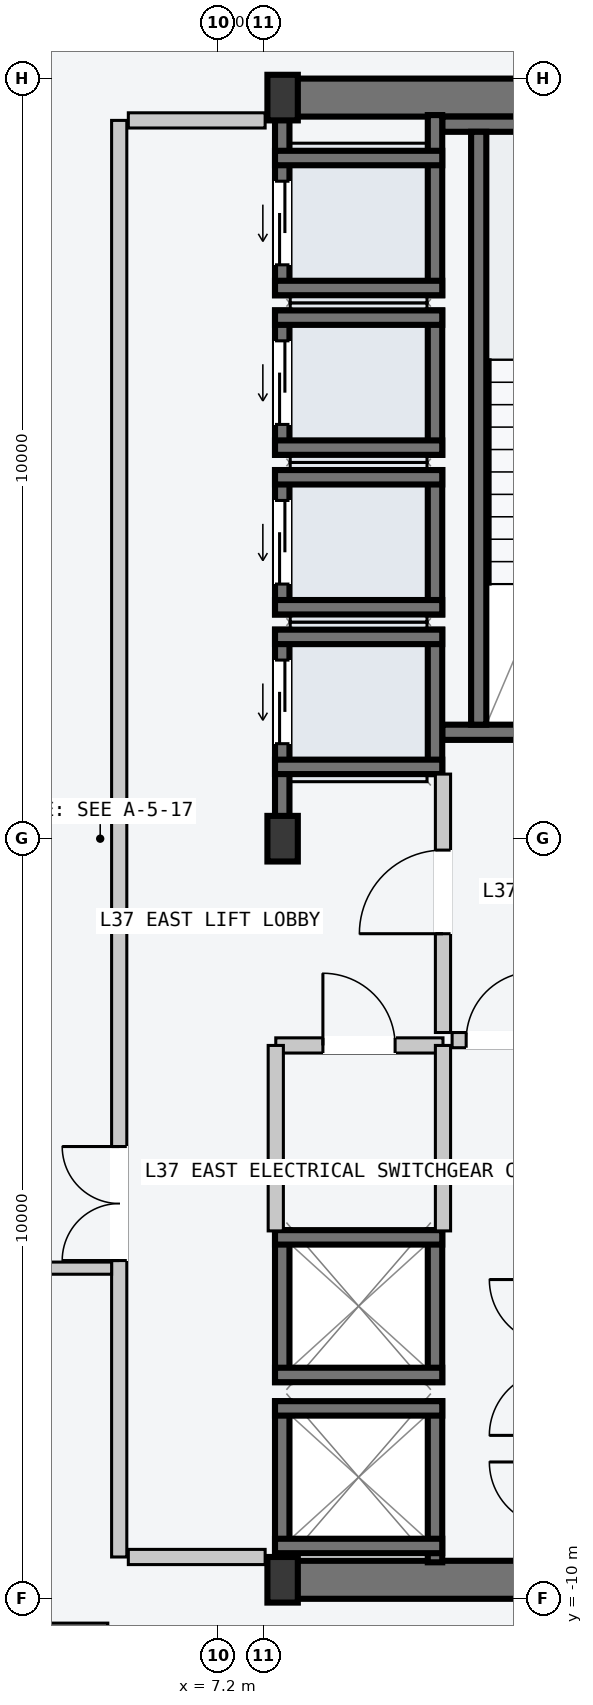
"""IFC4 building model, lengths in metres.
Left out: names, types, materials, properties, quantities, classifications, styles, units other than length and angle.
Written with IfcOpenShell. Run it as: python <this file> out.ifc"""

import sys

from ifc_helpers import new_model, si_unit, direction, frame, frame_2d, origin, origin_2d, place, context, subcontext, project, spatial, rectangle, i_section, extrude, element, fill, save


model = new_model("IFC4")
c1 = context("Model", 3, precision=1e-05, world=origin(), true_north=direction((0.0, 1.0)))
c2 = subcontext(c1, "Body", "Model", "MODEL_VIEW")
j1 = project(units=[si_unit("LENGTHUNIT", "METRE"), si_unit("PLANEANGLEUNIT", "RADIAN")], contexts=[c1])
p1 = place(None, origin())
s1 = spatial("IfcSite", under=j1, at=p1, CompositionType="ELEMENT")
p2 = place(p1, origin())
s2 = spatial("IfcBuilding", under=s1, at=p2, CompositionType="ELEMENT")
p3 = place(p2, frame((0.0, 0.0, 142.2)))
s3 = spatial("IfcBuildingStorey", under=s2, at=p3, CompositionType="ELEMENT", Elevation=142.2)
for number, where, z_axis, x_axis in (
    (1, (8.07, -9.75, -0.2), (0.0, 0.0, 1.0), (1.0, 0.0, 0.0)),
    (2, (8.07, 9.75, -0.2), (0.0, 0.0, 1.0), (1.0, 0.0, 0.0)),
):
    element("IfcWall", number, at=place(p3, frame(where, z_axis=z_axis, x_axis=x_axis)), inside=s3, PredefinedType="SHEAR", context=c2, shape_type="SweptSolid", body=[
        extrude(rectangle(XDim=6.46, YDim=0.5, at=frame_2d((3.23, 0.0))), origin(), (0.0, 0.0, 1.0), 3.6),
    ])
p4 = place(p3, frame((10.15, 1.4, -0.2), z_axis=(0.0, 0.0, 1.0), x_axis=(1.0, 0.0, 0.0)))
e3 = element("IfcWall", 3, at=p4, inside=s3, PredefinedType="SOLIDWALL", context=c2, shape_type="SweptSolid", body=[
    extrude(rectangle(XDim=4.1, YDim=0.2, at=frame_2d((2.05, 0.0))), origin(), (0.0, 0.0, 1.0), 3.6),
])
p5 = place(p4, frame((1.5, 0.0, 0.2)))
e4 = element("IfcOpeningElement", 4, at=p5, cuts=e3, PredefinedType="OPENING", context=c2, shape_type="SweptSolid", body=[
    extrude(rectangle(XDim=1.12, YDim=2.18, at=frame_2d((0.56, 1.09))), frame((0.0, 0.11, 0.0), z_axis=(0.0, -1.0, 0.0), x_axis=(1.0, 0.0, 0.0)), (0.0, 0.0, 1.0), 0.22),
])
p6 = place(p3, frame((10.15, 9.4, -0.2), z_axis=(0.0, 0.0, 1.0), x_axis=(1.0, 0.0, 0.0)))
e5 = element("IfcWall", 5, at=p6, inside=s3, PredefinedType="SOLIDWALL", context=c2, shape_type="SweptSolid", body=[
    extrude(rectangle(XDim=4.1, YDim=0.2, at=frame_2d((2.05, 0.0))), origin(), (0.0, 0.0, 1.0), 3.6),
])
p7 = place(p3, frame((10.63, 1.5, -0.2), z_axis=(0.0, 0.0, 1.0), x_axis=(0.0, 1.0, 0.0)))
e6 = element("IfcWall", 6, at=p7, inside=s3, PredefinedType="SOLIDWALL", context=c2, shape_type="SweptSolid", body=[
    extrude(rectangle(XDim=7.8, YDim=0.2, at=frame_2d((3.9, 0.0))), origin(), (0.0, 0.0, 1.0), 3.6),
])
for number, where, z_axis, x_axis in (
    (7, (8.05, -9.75, 0.0), (0.0, 0.0, 1.0), (1.0, 0.0, 0.0)),
    (8, (8.05, 0.0, 0.0), (0.0, 0.0, 1.0), (1.0, 0.0, 0.0)),
    (9, (8.05, 9.75, 0.0), (0.0, 0.0, 1.0), (1.0, 0.0, 0.0)),
):
    element("IfcColumn", number, at=place(p3, frame(where, z_axis=z_axis, x_axis=x_axis)), inside=s3, PredefinedType="COLUMN", context=c2, shape_type="SweptSolid", body=[
        extrude(i_section(OverallWidth=0.4, OverallDepth=0.6, WebThickness=0.022, FlangeThickness=0.036, at=origin_2d()), origin(), (0.0, 0.0, 1.0), 3.6),
    ])
p8 = place(p3, frame((8.045, 0.21, -0.2), z_axis=(0.0, 0.0, 1.0), x_axis=(0.0, 1.0, 0.0)))
e10 = element("IfcWall", 10, at=p8, inside=s3, PredefinedType="SOLIDWALL", context=c2, shape_type="SweptSolid", body=[
    extrude(rectangle(XDim=2.54, YDim=0.19, at=frame_2d((1.27, 0.0))), origin(), (0.0, 0.0, 1.0), 3.6),
])
p9 = place(p8, frame((1.04, 0.0, 0.2)))
e11 = element("IfcOpeningElement", 11, at=p9, cuts=e10, PredefinedType="OPENING", context=c2, shape_type="SweptSolid", body=[
    extrude(rectangle(XDim=1.1, YDim=2.2, at=frame_2d((0.55, 1.1))), frame((0.0, 0.105, 0.0), z_axis=(0.0, -1.0, 0.0), x_axis=(1.0, 0.0, 0.0)), (0.0, 0.0, 1.0), 0.21),
])
p10 = place(p3, frame((10.055, 0.85, -0.2), z_axis=(0.0, 0.0, 1.0), x_axis=(0.0, 1.0, 0.0)))
e12 = element("IfcWall", 12, at=p10, inside=s3, PredefinedType="SOLIDWALL", context=c2, shape_type="SweptSolid", body=[
    extrude(rectangle(XDim=1.9, YDim=0.19, at=frame_2d((0.95, 0.0))), origin(), (0.0, 0.0, 1.0), 3.6),
])
for number, where, z_axis, x_axis in (
    (13, (7.95, 2.655, -0.2), (0.0, 0.0, 1.0), (1.0, 0.0, 0.0)),
    (14, (7.95, 0.945, -0.2), (0.0, 0.0, 1.0), (1.0, 0.0, 0.0)),
):
    element("IfcWall", number, at=place(p3, frame(where, z_axis=z_axis, x_axis=x_axis)), inside=s3, PredefinedType="SOLIDWALL", context=c2, shape_type="SweptSolid", body=[
        extrude(rectangle(XDim=2.2, YDim=0.19, at=frame_2d((1.1, 0.0))), origin(), (0.0, 0.0, 1.0), 3.6),
    ])
p11 = place(p3, frame((8.045, 2.95, -0.2), z_axis=(0.0, 0.0, 1.0), x_axis=(0.0, 1.0, 0.0)))
e15 = element("IfcWall", 15, at=p11, inside=s3, PredefinedType="SOLIDWALL", context=c2, shape_type="SweptSolid", body=[
    extrude(rectangle(XDim=1.9, YDim=0.19, at=frame_2d((0.95, 0.0))), origin(), (0.0, 0.0, 1.0), 3.6),
])
p12 = place(p11, frame((0.4, 0.0, 0.2)))
e16 = element("IfcOpeningElement", 16, at=p12, cuts=e15, PredefinedType="OPENING", context=c2, shape_type="SweptSolid", body=[
    extrude(rectangle(XDim=1.1, YDim=2.2, at=frame_2d((0.55, 1.1))), frame((0.0, 0.105, 0.0), z_axis=(0.0, -1.0, 0.0), x_axis=(1.0, 0.0, 0.0)), (0.0, 0.0, 1.0), 0.21),
])
p13 = place(p3, frame((10.055, 2.95, -0.2), z_axis=(0.0, 0.0, 1.0), x_axis=(0.0, 1.0, 0.0)))
e17 = element("IfcWall", 17, at=p13, inside=s3, PredefinedType="SOLIDWALL", context=c2, shape_type="SweptSolid", body=[
    extrude(rectangle(XDim=1.9, YDim=0.19, at=frame_2d((0.95, 0.0))), origin(), (0.0, 0.0, 1.0), 3.6),
])
for number, where, z_axis, x_axis in (
    (18, (7.95, 4.755, -0.2), (0.0, 0.0, 1.0), (1.0, 0.0, 0.0)),
    (19, (7.95, 3.045, -0.2), (0.0, 0.0, 1.0), (1.0, 0.0, 0.0)),
):
    element("IfcWall", number, at=place(p3, frame(where, z_axis=z_axis, x_axis=x_axis)), inside=s3, PredefinedType="SOLIDWALL", context=c2, shape_type="SweptSolid", body=[
        extrude(rectangle(XDim=2.2, YDim=0.19, at=frame_2d((1.1, 0.0))), origin(), (0.0, 0.0, 1.0), 3.6),
    ])
p14 = place(p3, frame((8.045, 5.05, -0.2), z_axis=(0.0, 0.0, 1.0), x_axis=(0.0, 1.0, 0.0)))
e20 = element("IfcWall", 20, at=p14, inside=s3, PredefinedType="SOLIDWALL", context=c2, shape_type="SweptSolid", body=[
    extrude(rectangle(XDim=1.9, YDim=0.19, at=frame_2d((0.95, 0.0))), origin(), (0.0, 0.0, 1.0), 3.6),
])
p15 = place(p14, frame((0.4, 0.0, 0.2)))
e21 = element("IfcOpeningElement", 21, at=p15, cuts=e20, PredefinedType="OPENING", context=c2, shape_type="SweptSolid", body=[
    extrude(rectangle(XDim=1.1, YDim=2.2, at=frame_2d((0.55, 1.1))), frame((0.0, 0.105, 0.0), z_axis=(0.0, -1.0, 0.0), x_axis=(1.0, 0.0, 0.0)), (0.0, 0.0, 1.0), 0.21),
])
p16 = place(p3, frame((10.055, 5.05, -0.2), z_axis=(0.0, 0.0, 1.0), x_axis=(0.0, 1.0, 0.0)))
e22 = element("IfcWall", 22, at=p16, inside=s3, PredefinedType="SOLIDWALL", context=c2, shape_type="SweptSolid", body=[
    extrude(rectangle(XDim=1.9, YDim=0.19, at=frame_2d((0.95, 0.0))), origin(), (0.0, 0.0, 1.0), 3.6),
])
for number, where, z_axis, x_axis in (
    (23, (7.95, 6.855, -0.2), (0.0, 0.0, 1.0), (1.0, 0.0, 0.0)),
    (24, (7.95, 5.145, -0.2), (0.0, 0.0, 1.0), (1.0, 0.0, 0.0)),
):
    element("IfcWall", number, at=place(p3, frame(where, z_axis=z_axis, x_axis=x_axis)), inside=s3, PredefinedType="SOLIDWALL", context=c2, shape_type="SweptSolid", body=[
        extrude(rectangle(XDim=2.2, YDim=0.19, at=frame_2d((1.1, 0.0))), origin(), (0.0, 0.0, 1.0), 3.6),
    ])
p17 = place(p3, frame((8.045, 7.15, -0.2), z_axis=(0.0, 0.0, 1.0), x_axis=(0.0, 1.0, 0.0)))
e25 = element("IfcWall", 25, at=p17, inside=s3, PredefinedType="SOLIDWALL", context=c2, shape_type="SweptSolid", body=[
    extrude(rectangle(XDim=2.37, YDim=0.19, at=frame_2d((1.185, 0.0))), origin(), (0.0, 0.0, 1.0), 3.6),
])
p18 = place(p17, frame((0.4, 0.0, 0.2)))
e26 = element("IfcOpeningElement", 26, at=p18, cuts=e25, PredefinedType="OPENING", context=c2, shape_type="SweptSolid", body=[
    extrude(rectangle(XDim=1.1, YDim=2.2, at=frame_2d((0.55, 1.1))), frame((0.0, 0.105, 0.0), z_axis=(0.0, -1.0, 0.0), x_axis=(1.0, 0.0, 0.0)), (0.0, 0.0, 1.0), 0.21),
])
p19 = place(p3, frame((10.055, 7.15, -0.2), z_axis=(0.0, 0.0, 1.0), x_axis=(0.0, 1.0, 0.0)))
e27 = element("IfcWall", 27, at=p19, inside=s3, PredefinedType="SOLIDWALL", context=c2, shape_type="SweptSolid", body=[
    extrude(rectangle(XDim=2.37, YDim=0.19, at=frame_2d((1.185, 0.0))), origin(), (0.0, 0.0, 1.0), 3.6),
])
for number, where, z_axis, x_axis in (
    (28, (7.95, 8.955, -0.2), (0.0, 0.0, 1.0), (1.0, 0.0, 0.0)),
    (29, (7.95, 7.245, -0.2), (0.0, 0.0, 1.0), (1.0, 0.0, 0.0)),
):
    element("IfcWall", number, at=place(p3, frame(where, z_axis=z_axis, x_axis=x_axis)), inside=s3, PredefinedType="SOLIDWALL", context=c2, shape_type="SweptSolid", body=[
        extrude(rectangle(XDim=2.2, YDim=0.19, at=frame_2d((1.1, 0.0))), origin(), (0.0, 0.0, 1.0), 3.6),
    ])
for number, where, z_axis, x_axis in (
    (30, (8.045, -9.52, -0.2), (0.0, 0.0, 1.0), (0.0, 1.0, 0.0)),
    (31, (10.055, -9.52, -0.2), (0.0, 0.0, 1.0), (0.0, 1.0, 0.0)),
):
    element("IfcWall", number, at=place(p3, frame(where, z_axis=z_axis, x_axis=x_axis)), inside=s3, PredefinedType="SOLIDWALL", context=c2, shape_type="SweptSolid", body=[
        extrude(rectangle(XDim=2.12, YDim=0.19, at=frame_2d((1.06, 0.0))), origin(), (0.0, 0.0, 1.0), 3.6),
    ])
for number, where, z_axis, x_axis in (
    (32, (7.95, -7.495, -0.2), (0.0, 0.0, 1.0), (1.0, 0.0, 0.0)),
    (33, (7.95, -9.305, -0.2), (0.0, 0.0, 1.0), (1.0, 0.0, 0.0)),
):
    element("IfcWall", number, at=place(p3, frame(where, z_axis=z_axis, x_axis=x_axis)), inside=s3, PredefinedType="SOLIDWALL", context=c2, shape_type="SweptSolid", body=[
        extrude(rectangle(XDim=2.2, YDim=0.19, at=frame_2d((1.1, 0.0))), origin(), (0.0, 0.0, 1.0), 3.6),
    ])
for number, where, z_axis, x_axis in (
    (34, (8.045, -7.15, -0.2), (0.0, 0.0, 1.0), (0.0, 1.0, 0.0)),
    (35, (10.055, -7.15, -0.2), (0.0, 0.0, 1.0), (0.0, 1.0, 0.0)),
):
    element("IfcWall", number, at=place(p3, frame(where, z_axis=z_axis, x_axis=x_axis)), inside=s3, PredefinedType="SOLIDWALL", context=c2, shape_type="SweptSolid", body=[
        extrude(rectangle(XDim=2.0, YDim=0.19, at=frame_2d((1.0, 0.0))), origin(), (0.0, 0.0, 1.0), 3.6),
    ])
for number, where, z_axis, x_axis in (
    (36, (7.95, -5.245, -0.2), (0.0, 0.0, 1.0), (1.0, 0.0, 0.0)),
    (37, (7.95, -7.055, -0.2), (0.0, 0.0, 1.0), (1.0, 0.0, 0.0)),
):
    element("IfcWall", number, at=place(p3, frame(where, z_axis=z_axis, x_axis=x_axis)), inside=s3, PredefinedType="SOLIDWALL", context=c2, shape_type="SweptSolid", body=[
        extrude(rectangle(XDim=2.2, YDim=0.19, at=frame_2d((1.1, 0.0))), origin(), (0.0, 0.0, 1.0), 3.6),
    ])
p20 = place(p3, frame((5.9, -9.45, 0.0), z_axis=(0.0, 0.0, 1.0), x_axis=(0.0, 1.0, 0.0)))
e38 = element("IfcWall", 38, at=p20, inside=s3, PredefinedType="PARTITIONING", context=c2, shape_type="SweptSolid", body=[
    extrude(rectangle(XDim=18.9, YDim=0.2, at=frame_2d((9.45, 0.0))), origin(), (0.0, 0.0, 1.0), 3.4),
])
p21 = place(p20, frame((3.9, 0.0, 0.0)))
e39 = element("IfcOpeningElement", 39, at=p21, cuts=e38, PredefinedType="OPENING", context=c2, shape_type="SweptSolid", body=[
    extrude(rectangle(XDim=1.5, YDim=2.2, at=frame_2d((0.75, 1.1))), frame((0.0, 0.11, 0.0), z_axis=(0.0, -1.0, 0.0), x_axis=(1.0, 0.0, 0.0)), (0.0, 0.0, 1.0), 0.22),
])
for number, where, z_axis, x_axis in (
    (40, (6.02, -9.45, 0.0), (0.0, 0.0, 1.0), (1.0, 0.0, 0.0)),
    (41, (6.02, 9.45, 0.0), (0.0, 0.0, 1.0), (1.0, 0.0, 0.0)),
):
    element("IfcWall", number, at=place(p3, frame(where, z_axis=z_axis, x_axis=x_axis)), inside=s3, PredefinedType="PARTITIONING", context=c2, shape_type="SweptSolid", body=[
        extrude(rectangle(XDim=1.8, YDim=0.2, at=frame_2d((0.9, 0.0))), origin(), (0.0, 0.0, 1.0), 3.4),
    ])
p22 = place(p3, frame((10.16, -2.55, 0.0), z_axis=(0.0, 0.0, 1.0), x_axis=(0.0, 1.0, 0.0)))
e42 = element("IfcWall", 42, at=p22, inside=s3, PredefinedType="PARTITIONING", context=c2, shape_type="SweptSolid", body=[
    extrude(rectangle(XDim=3.4, YDim=0.2, at=frame_2d((1.7, 0.0))), origin(), (0.0, 0.0, 1.0), 3.4),
])
p23 = place(p22, frame((1.3, 0.0, 0.0)))
e43 = element("IfcOpeningElement", 43, at=p23, cuts=e42, PredefinedType="OPENING", context=c2, shape_type="SweptSolid", body=[
    extrude(rectangle(XDim=1.1, YDim=2.15, at=frame_2d((0.55, 1.075))), frame((0.0, 0.11, 0.0), z_axis=(0.0, -1.0, 0.0), x_axis=(1.0, 0.0, 0.0)), (0.0, 0.0, 1.0), 0.22),
])
p24 = place(p3, frame((10.28, -2.65, 0.0), z_axis=(0.0, 0.0, 1.0), x_axis=(1.0, 0.0, 0.0)))
e44 = element("IfcWall", 44, at=p24, inside=s3, PredefinedType="PARTITIONING", context=c2, shape_type="SweptSolid", body=[
    extrude(rectangle(XDim=1.27, YDim=0.2, at=frame_2d((0.635, 0.0))), origin(), (0.0, 0.0, 1.0), 3.4),
])
p25 = place(p24, frame((0.185, 0.0, 0.0)))
e45 = element("IfcOpeningElement", 45, at=p25, cuts=e44, PredefinedType="OPENING", context=c2, shape_type="SweptSolid", body=[
    extrude(rectangle(XDim=0.9, YDim=2.15, at=frame_2d((0.45, 1.075))), frame((0.0, 0.11, 0.0), z_axis=(0.0, -1.0, 0.0), x_axis=(1.0, 0.0, 0.0)), (0.0, 0.0, 1.0), 0.22),
])
p26 = place(p3, frame((7.96, -2.72, 0.0), z_axis=(0.0, 0.0, 1.0), x_axis=(1.0, 0.0, 0.0)))
e46 = element("IfcWall", 46, at=p26, inside=s3, PredefinedType="PARTITIONING", context=c2, shape_type="SweptSolid", body=[
    extrude(rectangle(XDim=2.2, YDim=0.2, at=frame_2d((1.1, 0.0))), origin(), (0.0, 0.0, 1.0), 3.4),
])
p27 = place(p26, frame((0.62, 0.0, 0.0)))
e47 = element("IfcOpeningElement", 47, at=p27, cuts=e46, PredefinedType="OPENING", context=c2, shape_type="SweptSolid", body=[
    extrude(rectangle(XDim=0.95, YDim=2.1, at=frame_2d((0.475, 1.05))), frame((0.0, 0.11, 0.0), z_axis=(0.0, -1.0, 0.0), x_axis=(1.0, 0.0, 0.0)), (0.0, 0.0, 1.0), 0.22),
])
for number, where, z_axis, x_axis in (
    (48, (7.96, -5.16, 0.0), (0.0, 0.0, 1.0), (0.0, 1.0, 0.0)),
    (49, (10.16, -5.16, 0.0), (0.0, 0.0, 1.0), (0.0, 1.0, 0.0)),
):
    element("IfcWall", number, at=place(p3, frame(where, z_axis=z_axis, x_axis=x_axis)), inside=s3, PredefinedType="PARTITIONING", context=c2, shape_type="SweptSolid", body=[
        extrude(rectangle(XDim=2.44, YDim=0.2, at=frame_2d((1.22, 0.0))), origin(), (0.0, 0.0, 1.0), 3.4),
    ])
p28 = place(p3, frame((-5.8, -5.65, 0.0), z_axis=(0.0, 0.0, 1.0), x_axis=(1.0, 0.0, 0.0)))
e50 = element("IfcWall", 50, at=p28, inside=s3, PredefinedType="PARTITIONING", context=c2, shape_type="SweptSolid", body=[
    extrude(rectangle(XDim=11.6, YDim=0.16, at=frame_2d((5.8, 0.0))), origin(), (0.0, 0.0, 1.0), 3.4),
])
p29 = place(p28, frame((5.1, 0.0, 0.0)))
e51 = element("IfcOpeningElement", 51, at=p29, cuts=e50, PredefinedType="OPENING", context=c2, shape_type="SweptSolid", body=[
    extrude(rectangle(XDim=1.4, YDim=2.2, at=frame_2d((0.7, 1.1))), frame((0.0, 0.09, 0.0), z_axis=(0.0, -1.0, 0.0), x_axis=(1.0, 0.0, 0.0)), (0.0, 0.0, 1.0), 0.18),
])
p30 = place(p3, frame((-5.75, -10.4, 0.0), z_axis=(0.0, 0.0, 1.0), x_axis=(1.0, 0.0, 0.0)))
e52 = element("IfcWall", 52, at=p30, inside=s3, PredefinedType="PARTITIONING", context=c2, shape_type="SweptSolid", body=[
    extrude(rectangle(XDim=11.5, YDim=0.16, at=frame_2d((5.75, 0.0))), origin(), (0.0, 0.0, 1.0), 3.4),
])
p31 = place(p30, frame((4.792, 0.0, 0.0)))
e53 = element("IfcOpeningElement", 53, at=p31, cuts=e52, PredefinedType="OPENING", context=c2, shape_type="SweptSolid", body=[
    extrude(rectangle(XDim=0.9, YDim=2.15, at=frame_2d((0.45, 1.075))), frame((0.0, 0.09, 0.0), z_axis=(0.0, -1.0, 0.0), x_axis=(1.0, 0.0, 0.0)), (0.0, 0.0, 1.0), 0.18),
])
p32 = place(p9, origin())
e54 = element("IfcDoor", 54, at=p32, inside=s3, OperationType="SLIDING_TO_LEFT", PredefinedType="DOOR", context=c2, shape_type="SweptSolid", body=[
    extrude(rectangle(XDim=1.1, YDim=2.2, at=frame_2d((0.55, 1.1))), frame((0.0, 0.025, 0.0), z_axis=(0.0, -1.0, 0.0), x_axis=(1.0, 0.0, 0.0)), (0.0, 0.0, 1.0), 0.05),
])
fill(e11, e54)
p33 = place(p12, origin())
e55 = element("IfcDoor", 55, at=p33, inside=s3, OperationType="SLIDING_TO_LEFT", PredefinedType="DOOR", context=c2, shape_type="SweptSolid", body=[
    extrude(rectangle(XDim=1.1, YDim=2.2, at=frame_2d((0.55, 1.1))), frame((0.0, 0.025, 0.0), z_axis=(0.0, -1.0, 0.0), x_axis=(1.0, 0.0, 0.0)), (0.0, 0.0, 1.0), 0.05),
])
fill(e16, e55)
p34 = place(p15, origin())
e56 = element("IfcDoor", 56, at=p34, inside=s3, OperationType="SLIDING_TO_LEFT", PredefinedType="DOOR", context=c2, shape_type="SweptSolid", body=[
    extrude(rectangle(XDim=1.1, YDim=2.2, at=frame_2d((0.55, 1.1))), frame((0.0, 0.025, 0.0), z_axis=(0.0, -1.0, 0.0), x_axis=(1.0, 0.0, 0.0)), (0.0, 0.0, 1.0), 0.05),
])
fill(e21, e56)
p35 = place(p18, origin())
e57 = element("IfcDoor", 57, at=p35, inside=s3, OperationType="SLIDING_TO_LEFT", PredefinedType="DOOR", context=c2, shape_type="SweptSolid", body=[
    extrude(rectangle(XDim=1.1, YDim=2.2, at=frame_2d((0.55, 1.1))), frame((0.0, 0.025, 0.0), z_axis=(0.0, -1.0, 0.0), x_axis=(1.0, 0.0, 0.0)), (0.0, 0.0, 1.0), 0.05),
])
fill(e26, e57)
p36 = place(p21, origin())
e58 = element("IfcDoor", 58, at=p36, inside=s3, OperationType="DOUBLE_DOOR_SINGLE_SWING", PredefinedType="DOOR", context=c2, shape_type="SweptSolid", body=[
    extrude(rectangle(XDim=1.5, YDim=2.2, at=frame_2d((0.75, 1.1))), frame((0.0, 0.025, 0.0), z_axis=(0.0, -1.0, 0.0), x_axis=(1.0, 0.0, 0.0)), (0.0, 0.0, 1.0), 0.05),
])
fill(e39, e58)
p37 = place(p23, origin())
e59 = element("IfcDoor", 59, at=p37, inside=s3, OperationType="SINGLE_SWING_LEFT", PredefinedType="DOOR", context=c2, shape_type="SweptSolid", body=[
    extrude(rectangle(XDim=1.1, YDim=2.15, at=frame_2d((0.55, 1.075))), frame((0.0, 0.025, 0.0), z_axis=(0.0, -1.0, 0.0), x_axis=(1.0, 0.0, 0.0)), (0.0, 0.0, 1.0), 0.05),
])
fill(e43, e59)
p38 = place(p25, origin())
e60 = element("IfcDoor", 60, at=p38, inside=s3, OperationType="SINGLE_SWING_RIGHT", PredefinedType="DOOR", context=c2, shape_type="SweptSolid", body=[
    extrude(rectangle(XDim=0.9, YDim=2.15, at=frame_2d((0.45, 1.075))), frame((0.0, 0.025, 0.0), z_axis=(0.0, -1.0, 0.0), x_axis=(1.0, 0.0, 0.0)), (0.0, 0.0, 1.0), 0.05),
])
fill(e45, e60)
p39 = place(p27, origin())
e61 = element("IfcDoor", 61, at=p39, inside=s3, OperationType="SINGLE_SWING_LEFT", PredefinedType="DOOR", context=c2, shape_type="SweptSolid", body=[
    extrude(rectangle(XDim=0.95, YDim=2.1, at=frame_2d((0.475, 1.05))), frame((0.0, 0.025, 0.0), z_axis=(0.0, -1.0, 0.0), x_axis=(1.0, 0.0, 0.0)), (0.0, 0.0, 1.0), 0.05),
])
fill(e47, e61)
save(model, sys.argv[1])
